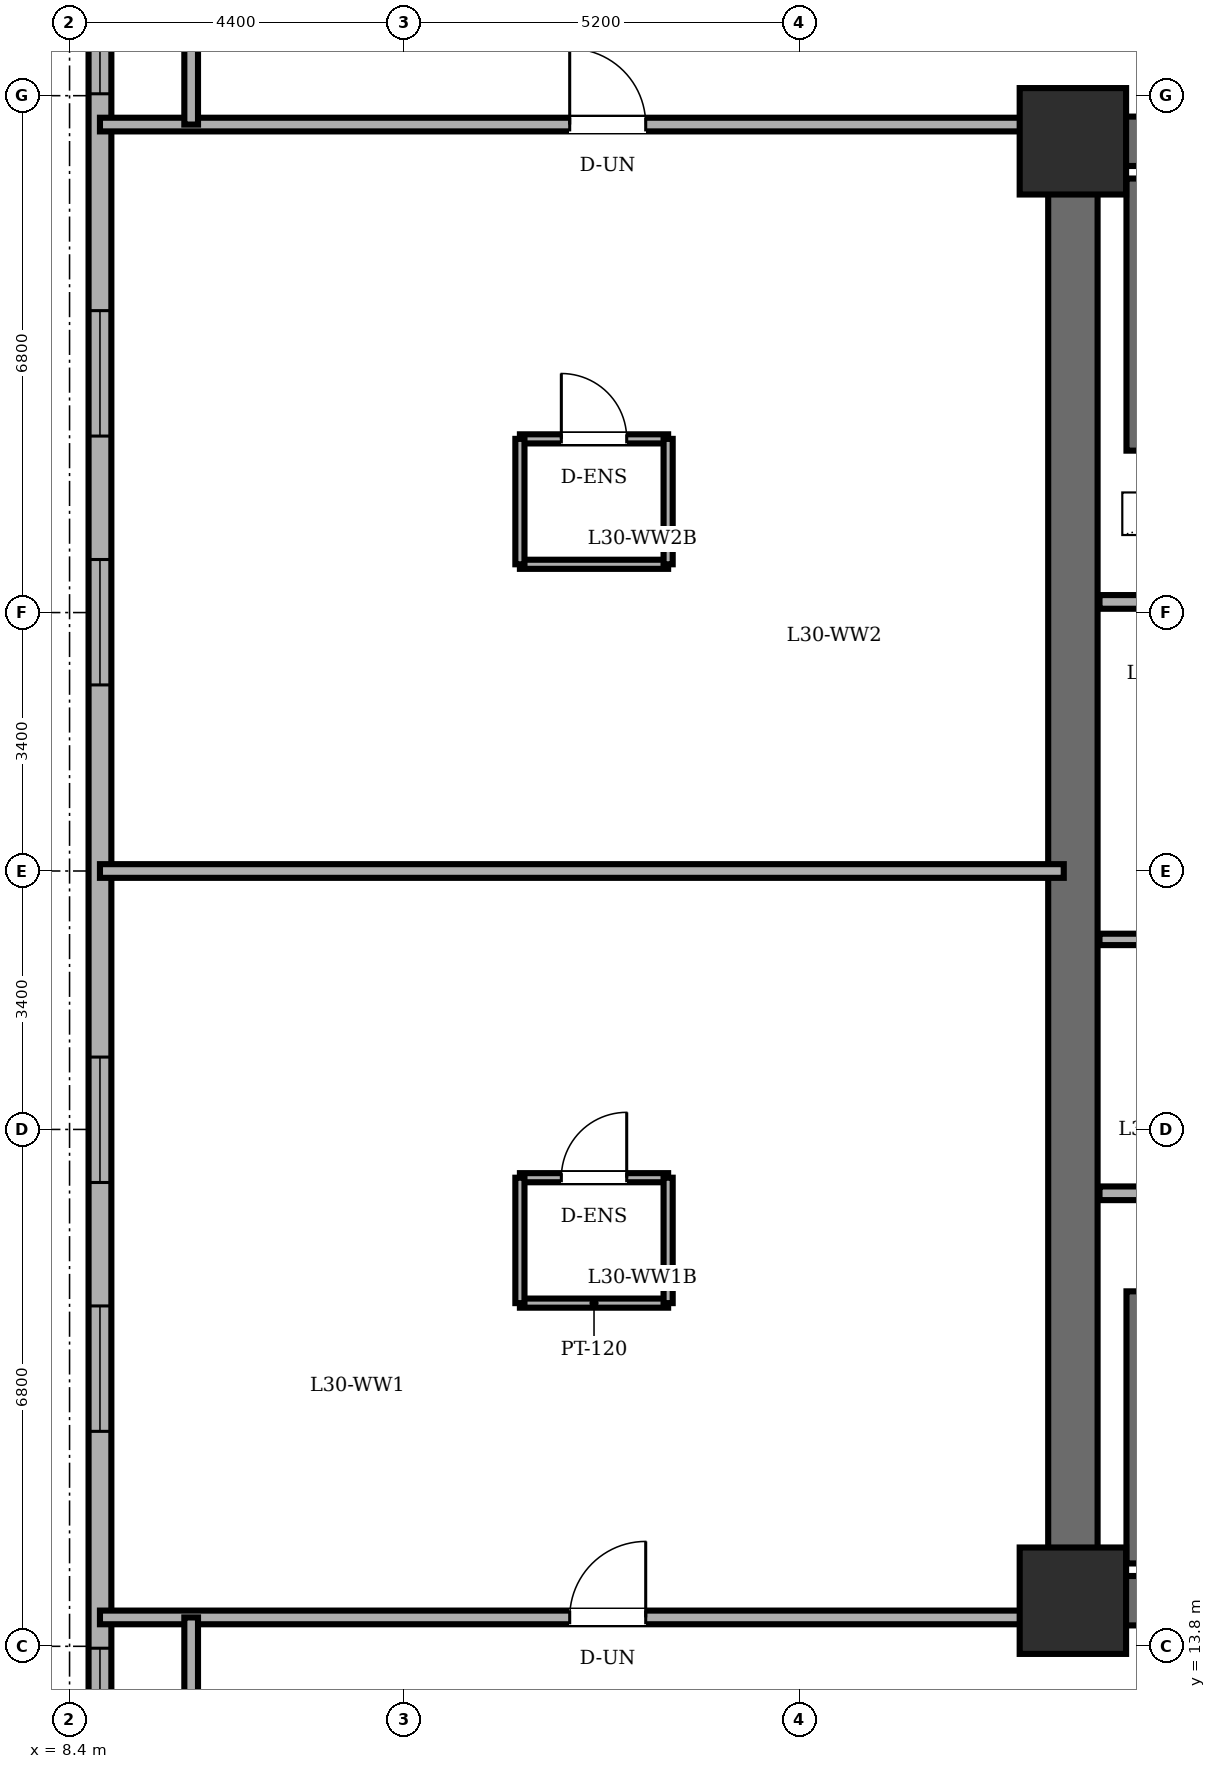
"""IFC4 building model, lengths in metres.
Left out: names, types, materials, properties, quantities, classifications, styles, units other than length and angle.
Written with IfcOpenShell. Run it as: python <this file> out.ifc"""

import sys

from ifc_helpers import new_model, si_unit, direction, frame, frame_2d, origin, origin_2d, place, context, subcontext, project, spatial, rectangle, extrude, element, fill, save


model = new_model("IFC4")
c1 = context("Model", 3, precision=1e-05, world=origin(), true_north=direction((0.0, 1.0)))
c2 = subcontext(c1, "Body", "Model", "MODEL_VIEW")
j1 = project(units=[si_unit("LENGTHUNIT", "METRE"), si_unit("PLANEANGLEUNIT", "RADIAN")], contexts=[c1])
p1 = place(None, origin())
s1 = spatial("IfcSite", under=j1, at=p1, CompositionType="ELEMENT")
p2 = place(p1, origin())
s2 = spatial("IfcBuilding", under=s1, at=p2, CompositionType="ELEMENT")
p3 = place(p2, frame((0.0, 0.0, 115.1)))
s3 = spatial("IfcBuildingStorey", under=s2, at=p3, CompositionType="ELEMENT", Elevation=115.1)
for number, where, z_axis, x_axis in (
    (1, (21.6, 14.4, 0.0), (0.0, 0.0, 1.0), (1.0, 0.0, 0.0)),
    (2, (21.6, 33.6, 0.0), (0.0, 0.0, 1.0), (1.0, 0.0, 0.0)),
):
    element("IfcColumn", number, at=place(p3, frame(where, z_axis=z_axis, x_axis=x_axis)), inside=s3, PredefinedType="COLUMN", context=c2, shape_type="SweptSolid", body=[
        extrude(rectangle(XDim=1.4, YDim=1.4, at=origin_2d()), origin(), (0.0, 0.0, 1.0), 3.6),
    ])
p4 = place(p3, frame((8.8, 38.2, 0.0), z_axis=(0.0, 0.0, 1.0), x_axis=(0.0, -1.0, 0.0)))
e3 = element("IfcWall", 3, at=p4, inside=s3, PredefinedType="SOLIDWALL", context=c2, shape_type="SweptSolid", body=[
    extrude(rectangle(XDim=28.4, YDim=0.3, at=frame_2d((14.2, 0.0))), origin(), (0.0, 0.0, 1.0), 3.4),
])
p5 = place(p4, frame((2.325, 0.0, 0.85)))
e4 = element("IfcOpeningElement", 4, at=p5, cuts=e3, PredefinedType="OPENING", context=c2, shape_type="SweptSolid", body=[
    extrude(rectangle(XDim=1.65, YDim=1.55, at=frame_2d((0.825, 0.775))), frame((0.0, 0.16, 0.0), z_axis=(0.0, -1.0, 0.0), x_axis=(1.0, 0.0, 0.0)), (0.0, 0.0, 1.0), 0.32),
])
p6 = place(p4, frame((6.828, 0.0, 0.85)))
e5 = element("IfcOpeningElement", 5, at=p6, cuts=e3, PredefinedType="OPENING", context=c2, shape_type="SweptSolid", body=[
    extrude(rectangle(XDim=1.65, YDim=1.55, at=frame_2d((0.825, 0.775))), frame((0.0, 0.16, 0.0), z_axis=(0.0, -1.0, 0.0), x_axis=(1.0, 0.0, 0.0)), (0.0, 0.0, 1.0), 0.32),
])
p7 = place(p4, frame((10.102, 0.0, 0.85)))
e6 = element("IfcOpeningElement", 6, at=p7, cuts=e3, PredefinedType="OPENING", context=c2, shape_type="SweptSolid", body=[
    extrude(rectangle(XDim=1.65, YDim=1.55, at=frame_2d((0.825, 0.775))), frame((0.0, 0.16, 0.0), z_axis=(0.0, -1.0, 0.0), x_axis=(1.0, 0.0, 0.0)), (0.0, 0.0, 1.0), 0.32),
])
p8 = place(p4, frame((16.648, 0.0, 0.85)))
e7 = element("IfcOpeningElement", 7, at=p8, cuts=e3, PredefinedType="OPENING", context=c2, shape_type="SweptSolid", body=[
    extrude(rectangle(XDim=1.65, YDim=1.55, at=frame_2d((0.825, 0.775))), frame((0.0, 0.16, 0.0), z_axis=(0.0, -1.0, 0.0), x_axis=(1.0, 0.0, 0.0)), (0.0, 0.0, 1.0), 0.32),
])
p9 = place(p4, frame((19.922, 0.0, 0.85)))
e8 = element("IfcOpeningElement", 8, at=p9, cuts=e3, PredefinedType="OPENING", context=c2, shape_type="SweptSolid", body=[
    extrude(rectangle(XDim=1.65, YDim=1.55, at=frame_2d((0.825, 0.775))), frame((0.0, 0.16, 0.0), z_axis=(0.0, -1.0, 0.0), x_axis=(1.0, 0.0, 0.0)), (0.0, 0.0, 1.0), 0.32),
])
p10 = place(p4, frame((24.425, 0.0, 0.85)))
e9 = element("IfcOpeningElement", 9, at=p10, cuts=e3, PredefinedType="OPENING", context=c2, shape_type="SweptSolid", body=[
    extrude(rectangle(XDim=1.65, YDim=1.55, at=frame_2d((0.825, 0.775))), frame((0.0, 0.16, 0.0), z_axis=(0.0, -1.0, 0.0), x_axis=(1.0, 0.0, 0.0)), (0.0, 0.0, 1.0), 0.32),
])
p11 = place(p3, frame((21.6, 14.4, 0.0), z_axis=(0.0, 0.0, 1.0), x_axis=(0.0, 1.0, 0.0)))
e10 = element("IfcWall", 10, at=p11, inside=s3, PredefinedType="SHEAR", context=c2, shape_type="SweptSolid", body=[
    extrude(rectangle(XDim=19.2, YDim=0.65, at=frame_2d((9.6, 0.0))), origin(), (0.0, 0.0, 1.0), 3.4),
])
for number, where, z_axis, x_axis in (
    (11, (21.6, 33.6, 0.0), (0.0, 0.0, 1.0), (1.0, 0.0, 0.0)),
    (12, (37.2, 14.4, 0.0), (0.0, 0.0, 1.0), (-1.0, 0.0, 0.0)),
):
    element("IfcWall", number, at=place(p3, frame(where, z_axis=z_axis, x_axis=x_axis)), inside=s3, PredefinedType="SHEAR", context=c2, shape_type="SweptSolid", body=[
        extrude(rectangle(XDim=15.6, YDim=0.65, at=frame_2d((7.8, 0.0))), origin(), (0.0, 0.0, 1.0), 3.4),
    ])
for number, where, z_axis, x_axis in (
    (13, (22.48, 29.53, 0.0), (0.0, 0.0, 1.0), (0.0, 1.0, 0.0)),
    (14, (22.48, 14.89, 0.0), (0.0, 0.0, 1.0), (0.0, 1.0, 0.0)),
):
    element("IfcWall", number, at=place(p3, frame(where, z_axis=z_axis, x_axis=x_axis)), inside=s3, PredefinedType="SOLIDWALL", context=c2, shape_type="SweptSolid", body=[
        extrude(rectangle(XDim=3.58, YDim=0.35, at=frame_2d((1.79, 0.0))), origin(), (0.0, 0.0, 1.0), 3.4),
    ])
p12 = place(p3, frame((21.95, 27.54, 0.0), z_axis=(0.0, 0.0, 1.0), x_axis=(1.0, 0.0, 0.0)))
e15 = element("IfcWall", 15, at=p12, inside=s3, PredefinedType="PARTITIONING", context=c2, shape_type="SweptSolid", body=[
    extrude(rectangle(XDim=10.56, YDim=0.18, at=frame_2d((5.28, 0.0))), origin(), (0.0, 0.0, 1.0), 3.4),
])
p13 = place(p3, frame((21.95, 19.76, 0.0), z_axis=(0.0, 0.0, 1.0), x_axis=(1.0, 0.0, 0.0)))
e16 = element("IfcWall", 16, at=p13, inside=s3, PredefinedType="PARTITIONING", context=c2, shape_type="SweptSolid", body=[
    extrude(rectangle(XDim=14.87, YDim=0.18, at=frame_2d((7.435, 0.0))), origin(), (0.0, 0.0, 1.0), 3.4),
])
p14 = place(p3, frame((21.95, 23.1, 0.0), z_axis=(0.0, 0.0, 1.0), x_axis=(1.0, 0.0, 0.0)))
e17 = element("IfcWall", 17, at=p14, inside=s3, PredefinedType="PARTITIONING", context=c2, shape_type="SweptSolid", body=[
    extrude(rectangle(XDim=2.51, YDim=0.15, at=frame_2d((1.255, 0.0))), origin(), (0.0, 0.0, 1.0), 3.4),
])
p15 = place(p3, frame((14.325, 19.965, 0.0), z_axis=(0.0, 0.0, 1.0), x_axis=(1.0, 0.0, 0.0)))
e18 = element("IfcWall", 18, at=p15, inside=s3, PredefinedType="PARTITIONING", context=c2, shape_type="SweptSolid", body=[
    extrude(rectangle(XDim=1.95, YDim=0.12, at=frame_2d((0.975, 0.0))), origin(), (0.0, 0.0, 1.0), 3.4),
])
p16 = place(p15, frame((0.545, 0.0, 0.0)))
e19 = element("IfcOpeningElement", 19, at=p16, cuts=e18, PredefinedType="OPENING", context=c2, shape_type="SweptSolid", body=[
    extrude(rectangle(XDim=0.86, YDim=2.1, at=frame_2d((0.43, 1.05))), frame((0.0, 0.07, 0.0), z_axis=(0.0, -1.0, 0.0), x_axis=(1.0, 0.0, 0.0)), (0.0, 0.0, 1.0), 0.14),
])
p17 = place(p3, frame((16.275, 18.315, 0.0), z_axis=(0.0, 0.0, 1.0), x_axis=(-1.0, 0.0, 0.0)))
e20 = element("IfcWall", 20, at=p17, inside=s3, PredefinedType="PARTITIONING", context=c2, shape_type="SweptSolid", body=[
    extrude(rectangle(XDim=1.95, YDim=0.12, at=frame_2d((0.975, 0.0))), origin(), (0.0, 0.0, 1.0), 3.4),
])
for number, where, z_axis, x_axis in (
    (21, (14.325, 19.965, 0.0), (0.0, 0.0, 1.0), (0.0, -1.0, 0.0)),
    (22, (16.275, 18.315, 0.0), (0.0, 0.0, 1.0), (0.0, 1.0, 0.0)),
):
    element("IfcWall", number, at=place(p3, frame(where, z_axis=z_axis, x_axis=x_axis)), inside=s3, PredefinedType="PARTITIONING", context=c2, shape_type="SweptSolid", body=[
        extrude(rectangle(XDim=1.65, YDim=0.12, at=frame_2d((0.825, 0.0))), origin(), (0.0, 0.0, 1.0), 3.4),
    ])
p18 = place(p3, frame((14.325, 29.685, 0.0), z_axis=(0.0, 0.0, 1.0), x_axis=(1.0, 0.0, 0.0)))
e23 = element("IfcWall", 23, at=p18, inside=s3, PredefinedType="PARTITIONING", context=c2, shape_type="SweptSolid", body=[
    extrude(rectangle(XDim=1.95, YDim=0.12, at=frame_2d((0.975, 0.0))), origin(), (0.0, 0.0, 1.0), 3.4),
])
p19 = place(p18, frame((0.545, 0.0, 0.0)))
e24 = element("IfcOpeningElement", 24, at=p19, cuts=e23, PredefinedType="OPENING", context=c2, shape_type="SweptSolid", body=[
    extrude(rectangle(XDim=0.86, YDim=2.1, at=frame_2d((0.43, 1.05))), frame((0.0, 0.07, 0.0), z_axis=(0.0, -1.0, 0.0), x_axis=(1.0, 0.0, 0.0)), (0.0, 0.0, 1.0), 0.14),
])
p20 = place(p3, frame((16.275, 28.035, 0.0), z_axis=(0.0, 0.0, 1.0), x_axis=(-1.0, 0.0, 0.0)))
e25 = element("IfcWall", 25, at=p20, inside=s3, PredefinedType="PARTITIONING", context=c2, shape_type="SweptSolid", body=[
    extrude(rectangle(XDim=1.95, YDim=0.12, at=frame_2d((0.975, 0.0))), origin(), (0.0, 0.0, 1.0), 3.4),
])
for number, where, z_axis, x_axis in (
    (26, (14.325, 29.685, 0.0), (0.0, 0.0, 1.0), (0.0, -1.0, 0.0)),
    (27, (16.275, 28.035, 0.0), (0.0, 0.0, 1.0), (0.0, 1.0, 0.0)),
):
    element("IfcWall", number, at=place(p3, frame(where, z_axis=z_axis, x_axis=x_axis)), inside=s3, PredefinedType="PARTITIONING", context=c2, shape_type="SweptSolid", body=[
        extrude(rectangle(XDim=1.65, YDim=0.12, at=frame_2d((0.825, 0.0))), origin(), (0.0, 0.0, 1.0), 3.4),
    ])
p21 = place(p3, frame((8.8, 14.18, 0.0), z_axis=(0.0, 0.0, 1.0), x_axis=(1.0, 0.0, 0.0)))
e28 = element("IfcWall", 28, at=p21, inside=s3, PredefinedType="PARTITIONING", context=c2, shape_type="SweptSolid", body=[
    extrude(rectangle(XDim=12.68, YDim=0.18, at=frame_2d((6.34, 0.0))), origin(), (0.0, 0.0, 1.0), 3.4),
])
p22 = place(p21, frame((6.18, 0.0, 0.0)))
e29 = element("IfcOpeningElement", 29, at=p22, cuts=e28, PredefinedType="OPENING", context=c2, shape_type="SweptSolid", body=[
    extrude(rectangle(XDim=1.0, YDim=2.15, at=frame_2d((0.5, 1.075))), frame((0.0, 0.1, 0.0), z_axis=(0.0, -1.0, 0.0), x_axis=(1.0, 0.0, 0.0)), (0.0, 0.0, 1.0), 0.2),
])
p23 = place(p3, frame((8.8, 24.0, 0.0), z_axis=(0.0, 0.0, 1.0), x_axis=(1.0, 0.0, 0.0)))
e30 = element("IfcWall", 30, at=p23, inside=s3, PredefinedType="PARTITIONING", context=c2, shape_type="SweptSolid", body=[
    extrude(rectangle(XDim=12.68, YDim=0.18, at=frame_2d((6.34, 0.0))), origin(), (0.0, 0.0, 1.0), 3.4),
])
p24 = place(p3, frame((8.8, 33.82, 0.0), z_axis=(0.0, 0.0, 1.0), x_axis=(1.0, 0.0, 0.0)))
e31 = element("IfcWall", 31, at=p24, inside=s3, PredefinedType="PARTITIONING", context=c2, shape_type="SweptSolid", body=[
    extrude(rectangle(XDim=12.68, YDim=0.18, at=frame_2d((6.34, 0.0))), origin(), (0.0, 0.0, 1.0), 3.4),
])
p25 = place(p24, frame((6.18, 0.0, 0.0)))
e32 = element("IfcOpeningElement", 32, at=p25, cuts=e31, PredefinedType="OPENING", context=c2, shape_type="SweptSolid", body=[
    extrude(rectangle(XDim=1.0, YDim=2.15, at=frame_2d((0.5, 1.075))), frame((0.0, 0.1, 0.0), z_axis=(0.0, -1.0, 0.0), x_axis=(1.0, 0.0, 0.0)), (0.0, 0.0, 1.0), 0.2),
])
for number, where, z_axis, x_axis in (
    (33, (10.0, 11.72, 0.0), (0.0, 0.0, 1.0), (0.0, 1.0, 0.0)),
    (34, (10.0, 33.82, 0.0), (0.0, 0.0, 1.0), (0.0, 1.0, 0.0)),
):
    element("IfcWall", number, at=place(p3, frame(where, z_axis=z_axis, x_axis=x_axis)), inside=s3, PredefinedType="PARTITIONING", context=c2, shape_type="SweptSolid", body=[
        extrude(rectangle(XDim=2.46, YDim=0.18, at=frame_2d((1.23, 0.0))), origin(), (0.0, 0.0, 1.0), 3.4),
    ])
p26 = place(p5, origin())
e35 = element("IfcWindow", 35, at=p26, inside=s3, PartitioningType="DOUBLE_PANEL_VERTICAL", PredefinedType="WINDOW", context=c2, shape_type="SweptSolid", body=[
    extrude(rectangle(XDim=1.65, YDim=1.55, at=frame_2d((0.825, 0.775))), frame((0.0, 0.03, 0.0), z_axis=(0.0, -1.0, 0.0), x_axis=(1.0, 0.0, 0.0)), (0.0, 0.0, 1.0), 0.06),
])
fill(e4, e35)
p27 = place(p6, origin())
e36 = element("IfcWindow", 36, at=p27, inside=s3, PartitioningType="DOUBLE_PANEL_VERTICAL", PredefinedType="WINDOW", context=c2, shape_type="SweptSolid", body=[
    extrude(rectangle(XDim=1.65, YDim=1.55, at=frame_2d((0.825, 0.775))), frame((0.0, 0.03, 0.0), z_axis=(0.0, -1.0, 0.0), x_axis=(1.0, 0.0, 0.0)), (0.0, 0.0, 1.0), 0.06),
])
fill(e5, e36)
p28 = place(p7, origin())
e37 = element("IfcWindow", 37, at=p28, inside=s3, PartitioningType="DOUBLE_PANEL_VERTICAL", PredefinedType="WINDOW", context=c2, shape_type="SweptSolid", body=[
    extrude(rectangle(XDim=1.65, YDim=1.55, at=frame_2d((0.825, 0.775))), frame((0.0, 0.03, 0.0), z_axis=(0.0, -1.0, 0.0), x_axis=(1.0, 0.0, 0.0)), (0.0, 0.0, 1.0), 0.06),
])
fill(e6, e37)
p29 = place(p8, origin())
e38 = element("IfcWindow", 38, at=p29, inside=s3, PartitioningType="DOUBLE_PANEL_VERTICAL", PredefinedType="WINDOW", context=c2, shape_type="SweptSolid", body=[
    extrude(rectangle(XDim=1.65, YDim=1.55, at=frame_2d((0.825, 0.775))), frame((0.0, 0.03, 0.0), z_axis=(0.0, -1.0, 0.0), x_axis=(1.0, 0.0, 0.0)), (0.0, 0.0, 1.0), 0.06),
])
fill(e7, e38)
p30 = place(p9, origin())
e39 = element("IfcWindow", 39, at=p30, inside=s3, PartitioningType="DOUBLE_PANEL_VERTICAL", PredefinedType="WINDOW", context=c2, shape_type="SweptSolid", body=[
    extrude(rectangle(XDim=1.65, YDim=1.55, at=frame_2d((0.825, 0.775))), frame((0.0, 0.03, 0.0), z_axis=(0.0, -1.0, 0.0), x_axis=(1.0, 0.0, 0.0)), (0.0, 0.0, 1.0), 0.06),
])
fill(e8, e39)
p31 = place(p10, origin())
e40 = element("IfcWindow", 40, at=p31, inside=s3, PartitioningType="DOUBLE_PANEL_VERTICAL", PredefinedType="WINDOW", context=c2, shape_type="SweptSolid", body=[
    extrude(rectangle(XDim=1.65, YDim=1.55, at=frame_2d((0.825, 0.775))), frame((0.0, 0.03, 0.0), z_axis=(0.0, -1.0, 0.0), x_axis=(1.0, 0.0, 0.0)), (0.0, 0.0, 1.0), 0.06),
])
fill(e9, e40)
p32 = place(p16, origin())
e41 = element("IfcDoor", 41, at=p32, inside=s3, OperationType="SINGLE_SWING_RIGHT", PredefinedType="DOOR", context=c2, shape_type="SweptSolid", body=[
    extrude(rectangle(XDim=0.86, YDim=2.1, at=frame_2d((0.43, 1.05))), frame((0.0, 0.025, 0.0), z_axis=(0.0, -1.0, 0.0), x_axis=(1.0, 0.0, 0.0)), (0.0, 0.0, 1.0), 0.05),
])
fill(e19, e41)
p33 = place(p19, origin())
e42 = element("IfcDoor", 42, at=p33, inside=s3, OperationType="SINGLE_SWING_LEFT", PredefinedType="DOOR", context=c2, shape_type="SweptSolid", body=[
    extrude(rectangle(XDim=0.86, YDim=2.1, at=frame_2d((0.43, 1.05))), frame((0.0, 0.025, 0.0), z_axis=(0.0, -1.0, 0.0), x_axis=(1.0, 0.0, 0.0)), (0.0, 0.0, 1.0), 0.05),
])
fill(e24, e42)
p34 = place(p22, origin())
e43 = element("IfcDoor", 43, at=p34, inside=s3, OperationType="SINGLE_SWING_RIGHT", PredefinedType="DOOR", context=c2, shape_type="SweptSolid", body=[
    extrude(rectangle(XDim=1.0, YDim=2.15, at=frame_2d((0.5, 1.075))), frame((0.0, 0.025, 0.0), z_axis=(0.0, -1.0, 0.0), x_axis=(1.0, 0.0, 0.0)), (0.0, 0.0, 1.0), 0.05),
])
fill(e29, e43)
p35 = place(p25, origin())
e44 = element("IfcDoor", 44, at=p35, inside=s3, OperationType="SINGLE_SWING_LEFT", PredefinedType="DOOR", context=c2, shape_type="SweptSolid", body=[
    extrude(rectangle(XDim=1.0, YDim=2.15, at=frame_2d((0.5, 1.075))), frame((0.0, 0.025, 0.0), z_axis=(0.0, -1.0, 0.0), x_axis=(1.0, 0.0, 0.0)), (0.0, 0.0, 1.0), 0.05),
])
fill(e32, e44)
save(model, sys.argv[1])
